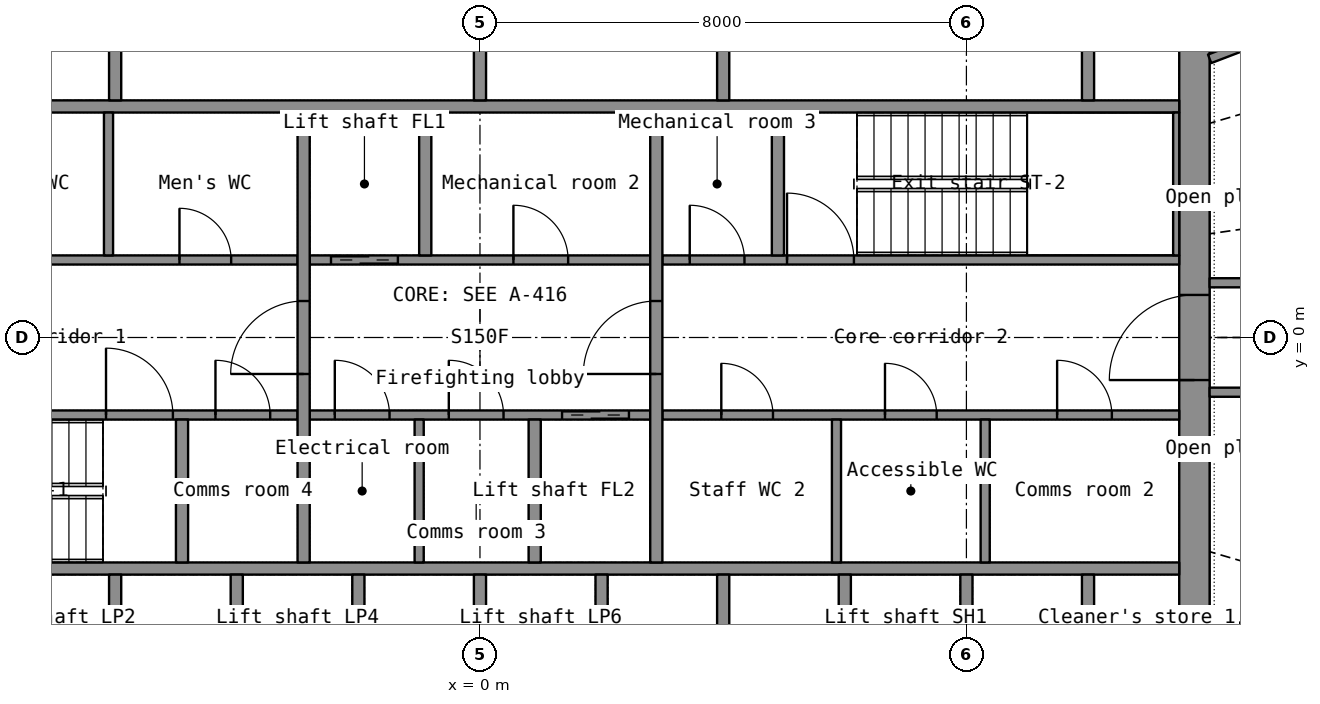
"""IFC4 building model, lengths in metres.
Left out: names, types, materials, properties, quantities, classifications, styles, units other than length and angle.
Written with IfcOpenShell. Run it as: python <this file> out.ifc"""

import sys

from ifc_helpers import new_model, si_unit, direction, frame, frame_2d, origin, place, context, subcontext, project, spatial, rectangle, extrude, element, fill, save


model = new_model("IFC4")
c1 = context("Model", 3, precision=1e-05, world=origin(), true_north=direction((0.0, 1.0)))
c2 = subcontext(c1, "Body", "Model", "MODEL_VIEW")
j1 = project(units=[si_unit("LENGTHUNIT", "METRE"), si_unit("PLANEANGLEUNIT", "RADIAN")], contexts=[c1])
p1 = place(None, origin())
s1 = spatial("IfcSite", under=j1, at=p1, CompositionType="ELEMENT")
p2 = place(p1, origin())
s2 = spatial("IfcBuilding", under=s1, at=p2, CompositionType="ELEMENT")
p3 = place(p2, frame((0.0, 0.0, 115.6)))
s3 = spatial("IfcBuildingStorey", under=s2, at=p3, CompositionType="ELEMENT", Elevation=115.6)
p4 = place(p3, frame((11.75, -7.2, 0.0), z_axis=(0.0, 0.0, 1.0), x_axis=(0.0, 1.0, 0.0)))
e1 = element("IfcWall", 1, at=p4, inside=s3, PredefinedType="SHEAR", context=c2, shape_type="SweptSolid", body=[
    extrude(rectangle(XDim=14.4, YDim=0.5, at=frame_2d((7.2, 0.0))), origin(), (0.0, 0.0, 1.0), 3.3),
])
p5 = place(p4, frame((6.5, 0.0, 0.0)))
e2 = element("IfcOpeningElement", 2, at=p5, cuts=e1, PredefinedType="OPENING", context=c2, shape_type="SweptSolid", body=[
    extrude(rectangle(XDim=1.4, YDim=2.2, at=frame_2d((0.7, 1.1))), frame((0.0, 0.26, 0.0), z_axis=(0.0, -1.0, 0.0), x_axis=(1.0, 0.0, 0.0)), (0.0, 0.0, 1.0), 0.52),
])
for number, where, z_axis, x_axis in (
    (3, (-11.5, -3.8, 0.0), (0.0, 0.0, 1.0), (1.0, 0.0, 0.0)),
    (4, (-11.5, 3.8, 0.0), (0.0, 0.0, 1.0), (1.0, 0.0, 0.0)),
):
    element("IfcWall", number, at=place(p3, frame(where, z_axis=z_axis, x_axis=x_axis)), inside=s3, PredefinedType="SHEAR", context=c2, shape_type="SweptSolid", body=[
        extrude(rectangle(XDim=23.0, YDim=0.2, at=frame_2d((11.5, 0.0))), origin(), (0.0, 0.0, 1.0), 3.3),
    ])
for number, where, z_axis, x_axis in (
    (5, (-6.0, -6.7, 0.0), (0.0, 0.0, 1.0), (0.0, 1.0, 0.0)),
    (6, (-4.0, -6.7, 0.0), (0.0, 0.0, 1.0), (0.0, 1.0, 0.0)),
    (7, (-2.0, -6.7, 0.0), (0.0, 0.0, 1.0), (0.0, 1.0, 0.0)),
    (8, (0.0, -6.7, 0.0), (0.0, 0.0, 1.0), (0.0, 1.0, 0.0)),
    (9, (2.0, -6.7, 0.0), (0.0, 0.0, 1.0), (0.0, 1.0, 0.0)),
    (10, (4.0, -6.7, 0.0), (0.0, 0.0, 1.0), (0.0, 1.0, 0.0)),
    (11, (6.0, -6.7, 0.0), (0.0, 0.0, 1.0), (0.0, 1.0, 0.0)),
    (12, (8.0, -6.7, 0.0), (0.0, 0.0, 1.0), (0.0, 1.0, 0.0)),
    (13, (10.0, -6.7, 0.0), (0.0, 0.0, 1.0), (0.0, 1.0, 0.0)),
    (14, (-6.0, 3.9, 0.0), (0.0, 0.0, 1.0), (0.0, 1.0, 0.0)),
    (15, (10.0, 3.9, 0.0), (0.0, 0.0, 1.0), (0.0, 1.0, 0.0)),
):
    element("IfcWall", number, at=place(p3, frame(where, z_axis=z_axis, x_axis=x_axis)), inside=s3, PredefinedType="SHEAR", context=c2, shape_type="SweptSolid", body=[
        extrude(rectangle(XDim=2.8, YDim=0.2, at=frame_2d((1.4, 0.0))), origin(), (0.0, 0.0, 1.0), 3.3),
    ])
for number, where, z_axis, x_axis in (
    (16, (0.0, 3.9, 0.0), (0.0, 0.0, 1.0), (0.0, 1.0, 0.0)),
    (17, (4.0, 3.9, 0.0), (0.0, 0.0, 1.0), (0.0, 1.0, 0.0)),
):
    element("IfcWall", number, at=place(p3, frame(where, z_axis=z_axis, x_axis=x_axis)), inside=s3, PredefinedType="PARTITIONING", context=c2, shape_type="SweptSolid", body=[
        extrude(rectangle(XDim=2.8, YDim=0.2, at=frame_2d((1.4, 0.0))), origin(), (0.0, 0.0, 1.0), 3.3),
    ])
p6 = place(p3, frame((-11.5, -1.275, 0.0), z_axis=(0.0, 0.0, 1.0), x_axis=(1.0, 0.0, 0.0)))
e18 = element("IfcWall", 18, at=p6, inside=s3, PredefinedType="SHEAR", context=c2, shape_type="SweptSolid", body=[
    extrude(rectangle(XDim=8.5, YDim=0.15, at=frame_2d((4.25, 0.0))), origin(), (0.0, 0.0, 1.0), 3.3),
])
p7 = place(p6, frame((5.35, 0.0, 0.0)))
e19 = element("IfcOpeningElement", 19, at=p7, cuts=e18, PredefinedType="OPENING", context=c2, shape_type="SweptSolid", body=[
    extrude(rectangle(XDim=1.1, YDim=2.15, at=frame_2d((0.55, 1.075))), frame((0.0, 0.085, 0.0), z_axis=(0.0, -1.0, 0.0), x_axis=(1.0, 0.0, 0.0)), (0.0, 0.0, 1.0), 0.17),
])
p8 = place(p6, frame((7.15, 0.0, 0.0)))
e20 = element("IfcOpeningElement", 20, at=p8, cuts=e18, PredefinedType="OPENING", context=c2, shape_type="SweptSolid", body=[
    extrude(rectangle(XDim=0.9, YDim=2.1, at=frame_2d((0.45, 1.05))), frame((0.0, 0.085, 0.0), z_axis=(0.0, -1.0, 0.0), x_axis=(1.0, 0.0, 0.0)), (0.0, 0.0, 1.0), 0.17),
])
p9 = place(p3, frame((-2.8, -1.275, 0.0), z_axis=(0.0, 0.0, 1.0), x_axis=(1.0, 0.0, 0.0)))
e21 = element("IfcWall", 21, at=p9, inside=s3, PredefinedType="SHEAR", context=c2, shape_type="SweptSolid", body=[
    extrude(rectangle(XDim=5.6, YDim=0.15, at=frame_2d((2.8, 0.0))), origin(), (0.0, 0.0, 1.0), 3.3),
])
p10 = place(p9, frame((4.15, 0.0, 0.0)))
e22 = element("IfcOpeningElement", 22, at=p10, cuts=e21, PredefinedType="OPENING", context=c2, shape_type="SweptSolid", body=[
    extrude(rectangle(XDim=1.1, YDim=2.2, at=frame_2d((0.55, 1.1))), frame((0.0, 0.085, 0.0), z_axis=(0.0, -1.0, 0.0), x_axis=(1.0, 0.0, 0.0)), (0.0, 0.0, 1.0), 0.17),
])
p11 = place(p9, frame((0.413, 0.0, 0.0)))
e23 = element("IfcOpeningElement", 23, at=p11, cuts=e21, PredefinedType="OPENING", context=c2, shape_type="SweptSolid", body=[
    extrude(rectangle(XDim=0.9, YDim=2.1, at=frame_2d((0.45, 1.05))), frame((0.0, 0.085, 0.0), z_axis=(0.0, -1.0, 0.0), x_axis=(1.0, 0.0, 0.0)), (0.0, 0.0, 1.0), 0.17),
])
p12 = place(p9, frame((2.288, 0.0, 0.0)))
e24 = element("IfcOpeningElement", 24, at=p12, cuts=e21, PredefinedType="OPENING", context=c2, shape_type="SweptSolid", body=[
    extrude(rectangle(XDim=0.9, YDim=2.1, at=frame_2d((0.45, 1.05))), frame((0.0, 0.085, 0.0), z_axis=(0.0, -1.0, 0.0), x_axis=(1.0, 0.0, 0.0)), (0.0, 0.0, 1.0), 0.17),
])
p13 = place(p3, frame((3.0, -1.275, 0.0), z_axis=(0.0, 0.0, 1.0), x_axis=(1.0, 0.0, 0.0)))
e25 = element("IfcWall", 25, at=p13, inside=s3, PredefinedType="PARTITIONING", context=c2, shape_type="SweptSolid", body=[
    extrude(rectangle(XDim=8.5, YDim=0.15, at=frame_2d((4.25, 0.0))), origin(), (0.0, 0.0, 1.0), 3.3),
])
p14 = place(p13, frame((0.969, 0.0, 0.0)))
e26 = element("IfcOpeningElement", 26, at=p14, cuts=e25, PredefinedType="OPENING", context=c2, shape_type="SweptSolid", body=[
    extrude(rectangle(XDim=0.85, YDim=2.1, at=frame_2d((0.425, 1.05))), frame((0.0, 0.085, 0.0), z_axis=(0.0, -1.0, 0.0), x_axis=(1.0, 0.0, 0.0)), (0.0, 0.0, 1.0), 0.17),
])
p15 = place(p13, frame((3.661, 0.0, 0.0)))
e27 = element("IfcOpeningElement", 27, at=p15, cuts=e25, PredefinedType="OPENING", context=c2, shape_type="SweptSolid", body=[
    extrude(rectangle(XDim=0.85, YDim=2.1, at=frame_2d((0.425, 1.05))), frame((0.0, 0.085, 0.0), z_axis=(0.0, -1.0, 0.0), x_axis=(1.0, 0.0, 0.0)), (0.0, 0.0, 1.0), 0.17),
])
p16 = place(p13, frame((6.492, 0.0, 0.0)))
e28 = element("IfcOpeningElement", 28, at=p16, cuts=e25, PredefinedType="OPENING", context=c2, shape_type="SweptSolid", body=[
    extrude(rectangle(XDim=0.9, YDim=2.1, at=frame_2d((0.45, 1.05))), frame((0.0, 0.085, 0.0), z_axis=(0.0, -1.0, 0.0), x_axis=(1.0, 0.0, 0.0)), (0.0, 0.0, 1.0), 0.17),
])
p17 = place(p3, frame((-11.5, 1.275, 0.0), z_axis=(0.0, 0.0, 1.0), x_axis=(1.0, 0.0, 0.0)))
e29 = element("IfcWall", 29, at=p17, inside=s3, PredefinedType="PARTITIONING", context=c2, shape_type="SweptSolid", body=[
    extrude(rectangle(XDim=8.5, YDim=0.15, at=frame_2d((4.25, 0.0))), origin(), (0.0, 0.0, 1.0), 3.3),
])
p18 = place(p17, frame((0.616, 0.0, 0.0)))
e30 = element("IfcOpeningElement", 30, at=p18, cuts=e29, PredefinedType="OPENING", context=c2, shape_type="SweptSolid", body=[
    extrude(rectangle(XDim=0.9, YDim=2.1, at=frame_2d((0.45, 1.05))), frame((0.0, 0.085, 0.0), z_axis=(0.0, -1.0, 0.0), x_axis=(1.0, 0.0, 0.0)), (0.0, 0.0, 1.0), 0.17),
])
p19 = place(p17, frame((3.374, 0.0, 0.0)))
e31 = element("IfcOpeningElement", 31, at=p19, cuts=e29, PredefinedType="OPENING", context=c2, shape_type="SweptSolid", body=[
    extrude(rectangle(XDim=0.85, YDim=2.1, at=frame_2d((0.425, 1.05))), frame((0.0, 0.085, 0.0), z_axis=(0.0, -1.0, 0.0), x_axis=(1.0, 0.0, 0.0)), (0.0, 0.0, 1.0), 0.17),
])
p20 = place(p17, frame((6.558, 0.0, 0.0)))
e32 = element("IfcOpeningElement", 32, at=p20, cuts=e29, PredefinedType="OPENING", context=c2, shape_type="SweptSolid", body=[
    extrude(rectangle(XDim=0.85, YDim=2.1, at=frame_2d((0.425, 1.05))), frame((0.0, 0.085, 0.0), z_axis=(0.0, -1.0, 0.0), x_axis=(1.0, 0.0, 0.0)), (0.0, 0.0, 1.0), 0.17),
])
p21 = place(p3, frame((-2.8, 1.275, 0.0), z_axis=(0.0, 0.0, 1.0), x_axis=(1.0, 0.0, 0.0)))
e33 = element("IfcWall", 33, at=p21, inside=s3, PredefinedType="SHEAR", context=c2, shape_type="SweptSolid", body=[
    extrude(rectangle(XDim=5.6, YDim=0.15, at=frame_2d((2.8, 0.0))), origin(), (0.0, 0.0, 1.0), 3.3),
])
p22 = place(p21, frame((0.35, 0.0, 0.0)))
e34 = element("IfcOpeningElement", 34, at=p22, cuts=e33, PredefinedType="OPENING", context=c2, shape_type="SweptSolid", body=[
    extrude(rectangle(XDim=1.1, YDim=2.2, at=frame_2d((0.55, 1.1))), frame((0.0, 0.085, 0.0), z_axis=(0.0, -1.0, 0.0), x_axis=(1.0, 0.0, 0.0)), (0.0, 0.0, 1.0), 0.17),
])
p23 = place(p21, frame((3.35, 0.0, 0.0)))
e35 = element("IfcOpeningElement", 35, at=p23, cuts=e33, PredefinedType="OPENING", context=c2, shape_type="SweptSolid", body=[
    extrude(rectangle(XDim=0.9, YDim=2.1, at=frame_2d((0.45, 1.05))), frame((0.0, 0.085, 0.0), z_axis=(0.0, -1.0, 0.0), x_axis=(1.0, 0.0, 0.0)), (0.0, 0.0, 1.0), 0.17),
])
p24 = place(p3, frame((3.0, 1.275, 0.0), z_axis=(0.0, 0.0, 1.0), x_axis=(1.0, 0.0, 0.0)))
e36 = element("IfcWall", 36, at=p24, inside=s3, PredefinedType="SHEAR", context=c2, shape_type="SweptSolid", body=[
    extrude(rectangle(XDim=8.5, YDim=0.15, at=frame_2d((4.25, 0.0))), origin(), (0.0, 0.0, 1.0), 3.3),
])
p25 = place(p24, frame((2.05, 0.0, 0.0)))
e37 = element("IfcOpeningElement", 37, at=p25, cuts=e36, PredefinedType="OPENING", context=c2, shape_type="SweptSolid", body=[
    extrude(rectangle(XDim=1.1, YDim=2.15, at=frame_2d((0.55, 1.075))), frame((0.0, 0.085, 0.0), z_axis=(0.0, -1.0, 0.0), x_axis=(1.0, 0.0, 0.0)), (0.0, 0.0, 1.0), 0.17),
])
p26 = place(p24, frame((0.45, 0.0, 0.0)))
e38 = element("IfcOpeningElement", 38, at=p26, cuts=e36, PredefinedType="OPENING", context=c2, shape_type="SweptSolid", body=[
    extrude(rectangle(XDim=0.9, YDim=2.1, at=frame_2d((0.45, 1.05))), frame((0.0, 0.085, 0.0), z_axis=(0.0, -1.0, 0.0), x_axis=(1.0, 0.0, 0.0)), (0.0, 0.0, 1.0), 0.17),
])
p27 = place(p3, frame((-2.9, -3.7, 0.0), z_axis=(0.0, 0.0, 1.0), x_axis=(0.0, 1.0, 0.0)))
e39 = element("IfcWall", 39, at=p27, inside=s3, PredefinedType="SHEAR", context=c2, shape_type="SweptSolid", body=[
    extrude(rectangle(XDim=7.4, YDim=0.2, at=frame_2d((3.7, 0.0))), origin(), (0.0, 0.0, 1.0), 3.3),
])
p28 = place(p27, frame((3.1, 0.0, 0.0)))
e40 = element("IfcOpeningElement", 40, at=p28, cuts=e39, PredefinedType="OPENING", context=c2, shape_type="SweptSolid", body=[
    extrude(rectangle(XDim=1.2, YDim=2.2, at=frame_2d((0.6, 1.1))), frame((0.0, 0.11, 0.0), z_axis=(0.0, -1.0, 0.0), x_axis=(1.0, 0.0, 0.0)), (0.0, 0.0, 1.0), 0.22),
])
p29 = place(p3, frame((2.9, -3.7, 0.0), z_axis=(0.0, 0.0, 1.0), x_axis=(0.0, 1.0, 0.0)))
e41 = element("IfcWall", 41, at=p29, inside=s3, PredefinedType="SHEAR", context=c2, shape_type="SweptSolid", body=[
    extrude(rectangle(XDim=7.4, YDim=0.2, at=frame_2d((3.7, 0.0))), origin(), (0.0, 0.0, 1.0), 3.3),
])
p30 = place(p29, frame((3.1, 0.0, 0.0)))
e42 = element("IfcOpeningElement", 42, at=p30, cuts=e41, PredefinedType="OPENING", context=c2, shape_type="SweptSolid", body=[
    extrude(rectangle(XDim=1.2, YDim=2.2, at=frame_2d((0.6, 1.1))), frame((0.0, 0.11, 0.0), z_axis=(0.0, -1.0, 0.0), x_axis=(1.0, 0.0, 0.0)), (0.0, 0.0, 1.0), 0.22),
])
for number, where, z_axis, x_axis in (
    (43, (-0.9, 1.35, 0.0), (0.0, 0.0, 1.0), (0.0, 1.0, 0.0)),
    (44, (0.9, -3.7, 0.0), (0.0, 0.0, 1.0), (0.0, 1.0, 0.0)),
):
    element("IfcWall", number, at=place(p3, frame(where, z_axis=z_axis, x_axis=x_axis)), inside=s3, PredefinedType="SHEAR", context=c2, shape_type="SweptSolid", body=[
        extrude(rectangle(XDim=2.35, YDim=0.2, at=frame_2d((1.175, 0.0))), origin(), (0.0, 0.0, 1.0), 3.3),
    ])
p31 = place(p3, frame((11.45, 1.35, 0.0), z_axis=(0.0, 0.0, 1.0), x_axis=(0.0, 1.0, 0.0)))
e45 = element("IfcWall", 45, at=p31, inside=s3, PredefinedType="SHEAR", context=c2, shape_type="SweptSolid", body=[
    extrude(rectangle(XDim=2.35, YDim=0.1, at=frame_2d((1.175, 0.0))), origin(), (0.0, 0.0, 1.0), 3.3),
])
for number, where, z_axis, x_axis in (
    (46, (-4.9, -3.7, 0.0), (0.0, 0.0, 1.0), (0.0, 1.0, 0.0)),
    (47, (4.9, 1.35, 0.0), (0.0, 0.0, 1.0), (0.0, 1.0, 0.0)),
):
    element("IfcWall", number, at=place(p3, frame(where, z_axis=z_axis, x_axis=x_axis)), inside=s3, PredefinedType="SHEAR", context=c2, shape_type="SweptSolid", body=[
        extrude(rectangle(XDim=2.35, YDim=0.2, at=frame_2d((1.175, 0.0))), origin(), (0.0, 0.0, 1.0), 3.3),
    ])
for number, where, z_axis, x_axis in (
    (48, (-6.109, 1.35, 0.0), (0.0, 0.0, 1.0), (0.0, 1.0, 0.0)),
    (49, (5.863, -3.7, 0.0), (0.0, 0.0, 1.0), (0.0, 1.0, 0.0)),
    (50, (8.309, -3.7, 0.0), (0.0, 0.0, 1.0), (0.0, 1.0, 0.0)),
    (51, (-1.0, -3.7, 0.0), (0.0, 0.0, 1.0), (0.0, 1.0, 0.0)),
):
    element("IfcWall", number, at=place(p3, frame(where, z_axis=z_axis, x_axis=x_axis)), inside=s3, PredefinedType="PARTITIONING", context=c2, shape_type="SweptSolid", body=[
        extrude(rectangle(XDim=2.35, YDim=0.15, at=frame_2d((1.175, 0.0))), origin(), (0.0, 0.0, 1.0), 3.3),
    ])
for number, where, z_axis, x_axis in (
    (52, (15.896, -6.072, 0.0), (0.0, 0.0, 1.0), (-0.934, 0.357, 0.0)),
    (53, (15.896, 6.072, 0.0), (0.0, 0.0, 1.0), (-0.934, -0.357, 0.0)),
):
    element("IfcWall", number, at=place(p3, frame(where, z_axis=z_axis, x_axis=x_axis)), inside=s3, PredefinedType="PARTITIONING", context=c2, shape_type="SweptSolid", body=[
        extrude(rectangle(XDim=4.171, YDim=0.15, at=frame_2d((2.085, 0.0))), origin(), (0.0, 0.0, 1.0), 2.4),
    ])
for number, where, z_axis, x_axis in (
    (54, (12.0, -0.9, 0.0), (0.0, 0.0, 1.0), (1.0, 0.0, 0.0)),
    (55, (15.923, 0.9, 0.0), (0.0, 0.0, 1.0), (-1.0, 0.0, 0.0)),
):
    element("IfcWall", number, at=place(p3, frame(where, z_axis=z_axis, x_axis=x_axis)), inside=s3, PredefinedType="PARTITIONING", context=c2, shape_type="SweptSolid", body=[
        extrude(rectangle(XDim=3.923, YDim=0.15, at=frame_2d((1.961, 0.0))), origin(), (0.0, 0.0, 1.0), 2.4),
    ])
p32 = place(p5, origin())
e56 = element("IfcDoor", 56, at=p32, inside=s3, OperationType="DOUBLE_DOOR_SINGLE_SWING", PredefinedType="DOOR", context=c2, shape_type="SweptSolid", body=[
    extrude(rectangle(XDim=1.4, YDim=2.2, at=frame_2d((0.7, 1.1))), frame((0.0, 0.025, 0.0), z_axis=(0.0, -1.0, 0.0), x_axis=(1.0, 0.0, 0.0)), (0.0, 0.0, 1.0), 0.05),
])
fill(e2, e56)
p33 = place(p28, origin())
e57 = element("IfcDoor", 57, at=p33, inside=s3, OperationType="SINGLE_SWING_LEFT", PredefinedType="DOOR", context=c2, shape_type="SweptSolid", body=[
    extrude(rectangle(XDim=1.2, YDim=2.2, at=frame_2d((0.6, 1.1))), frame((0.0, 0.025, 0.0), z_axis=(0.0, -1.0, 0.0), x_axis=(1.0, 0.0, 0.0)), (0.0, 0.0, 1.0), 0.05),
])
fill(e40, e57)
p34 = place(p30, origin())
e58 = element("IfcDoor", 58, at=p34, inside=s3, OperationType="SINGLE_SWING_LEFT", PredefinedType="DOOR", context=c2, shape_type="SweptSolid", body=[
    extrude(rectangle(XDim=1.2, YDim=2.2, at=frame_2d((0.6, 1.1))), frame((0.0, 0.025, 0.0), z_axis=(0.0, -1.0, 0.0), x_axis=(1.0, 0.0, 0.0)), (0.0, 0.0, 1.0), 0.05),
])
fill(e42, e58)
p35 = place(p22, origin())
e59 = element("IfcDoor", 59, at=p35, inside=s3, OperationType="DOUBLE_DOOR_SLIDING", PredefinedType="DOOR", context=c2, shape_type="SweptSolid", body=[
    extrude(rectangle(XDim=1.1, YDim=2.2, at=frame_2d((0.55, 1.1))), frame((0.0, 0.025, 0.0), z_axis=(0.0, -1.0, 0.0), x_axis=(1.0, 0.0, 0.0)), (0.0, 0.0, 1.0), 0.05),
])
fill(e34, e59)
p36 = place(p10, origin())
e60 = element("IfcDoor", 60, at=p36, inside=s3, OperationType="DOUBLE_DOOR_SLIDING", PredefinedType="DOOR", context=c2, shape_type="SweptSolid", body=[
    extrude(rectangle(XDim=1.1, YDim=2.2, at=frame_2d((0.55, 1.1))), frame((0.0, 0.025, 0.0), z_axis=(0.0, -1.0, 0.0), x_axis=(1.0, 0.0, 0.0)), (0.0, 0.0, 1.0), 0.05),
])
fill(e22, e60)
p37 = place(p7, origin())
e61 = element("IfcDoor", 61, at=p37, inside=s3, OperationType="SINGLE_SWING_LEFT", PredefinedType="DOOR", context=c2, shape_type="SweptSolid", body=[
    extrude(rectangle(XDim=1.1, YDim=2.15, at=frame_2d((0.55, 1.075))), frame((0.0, 0.025, 0.0), z_axis=(0.0, -1.0, 0.0), x_axis=(1.0, 0.0, 0.0)), (0.0, 0.0, 1.0), 0.05),
])
fill(e19, e61)
p38 = place(p25, origin())
e62 = element("IfcDoor", 62, at=p38, inside=s3, OperationType="SINGLE_SWING_LEFT", PredefinedType="DOOR", context=c2, shape_type="SweptSolid", body=[
    extrude(rectangle(XDim=1.1, YDim=2.15, at=frame_2d((0.55, 1.075))), frame((0.0, 0.025, 0.0), z_axis=(0.0, -1.0, 0.0), x_axis=(1.0, 0.0, 0.0)), (0.0, 0.0, 1.0), 0.05),
])
fill(e37, e62)
p39 = place(p20, origin())
e63 = element("IfcDoor", 63, at=p39, inside=s3, OperationType="SINGLE_SWING_LEFT", PredefinedType="DOOR", context=c2, shape_type="SweptSolid", body=[
    extrude(rectangle(XDim=0.85, YDim=2.1, at=frame_2d((0.425, 1.05))), frame((0.0, 0.025, 0.0), z_axis=(0.0, -1.0, 0.0), x_axis=(1.0, 0.0, 0.0)), (0.0, 0.0, 1.0), 0.05),
])
fill(e32, e63)
p40 = place(p14, origin())
e64 = element("IfcDoor", 64, at=p40, inside=s3, OperationType="SINGLE_SWING_LEFT", PredefinedType="DOOR", context=c2, shape_type="SweptSolid", body=[
    extrude(rectangle(XDim=0.85, YDim=2.1, at=frame_2d((0.425, 1.05))), frame((0.0, 0.025, 0.0), z_axis=(0.0, -1.0, 0.0), x_axis=(1.0, 0.0, 0.0)), (0.0, 0.0, 1.0), 0.05),
])
fill(e26, e64)
p41 = place(p15, origin())
e65 = element("IfcDoor", 65, at=p41, inside=s3, OperationType="SINGLE_SWING_LEFT", PredefinedType="DOOR", context=c2, shape_type="SweptSolid", body=[
    extrude(rectangle(XDim=0.85, YDim=2.1, at=frame_2d((0.425, 1.05))), frame((0.0, 0.025, 0.0), z_axis=(0.0, -1.0, 0.0), x_axis=(1.0, 0.0, 0.0)), (0.0, 0.0, 1.0), 0.05),
])
fill(e27, e65)
p42 = place(p16, origin())
e66 = element("IfcDoor", 66, at=p42, inside=s3, OperationType="SINGLE_SWING_LEFT", PredefinedType="DOOR", context=c2, shape_type="SweptSolid", body=[
    extrude(rectangle(XDim=0.9, YDim=2.1, at=frame_2d((0.45, 1.05))), frame((0.0, 0.025, 0.0), z_axis=(0.0, -1.0, 0.0), x_axis=(1.0, 0.0, 0.0)), (0.0, 0.0, 1.0), 0.05),
])
fill(e28, e66)
p43 = place(p23, origin())
e67 = element("IfcDoor", 67, at=p43, inside=s3, OperationType="SINGLE_SWING_LEFT", PredefinedType="DOOR", context=c2, shape_type="SweptSolid", body=[
    extrude(rectangle(XDim=0.9, YDim=2.1, at=frame_2d((0.45, 1.05))), frame((0.0, 0.025, 0.0), z_axis=(0.0, -1.0, 0.0), x_axis=(1.0, 0.0, 0.0)), (0.0, 0.0, 1.0), 0.05),
])
fill(e35, e67)
p44 = place(p11, origin())
e68 = element("IfcDoor", 68, at=p44, inside=s3, OperationType="SINGLE_SWING_LEFT", PredefinedType="DOOR", context=c2, shape_type="SweptSolid", body=[
    extrude(rectangle(XDim=0.9, YDim=2.1, at=frame_2d((0.45, 1.05))), frame((0.0, 0.025, 0.0), z_axis=(0.0, -1.0, 0.0), x_axis=(1.0, 0.0, 0.0)), (0.0, 0.0, 1.0), 0.05),
])
fill(e23, e68)
p45 = place(p12, origin())
e69 = element("IfcDoor", 69, at=p45, inside=s3, OperationType="SINGLE_SWING_LEFT", PredefinedType="DOOR", context=c2, shape_type="SweptSolid", body=[
    extrude(rectangle(XDim=0.9, YDim=2.1, at=frame_2d((0.45, 1.05))), frame((0.0, 0.025, 0.0), z_axis=(0.0, -1.0, 0.0), x_axis=(1.0, 0.0, 0.0)), (0.0, 0.0, 1.0), 0.05),
])
fill(e24, e69)
p46 = place(p26, origin())
e70 = element("IfcDoor", 70, at=p46, inside=s3, OperationType="SINGLE_SWING_LEFT", PredefinedType="DOOR", context=c2, shape_type="SweptSolid", body=[
    extrude(rectangle(XDim=0.9, YDim=2.1, at=frame_2d((0.45, 1.05))), frame((0.0, 0.025, 0.0), z_axis=(0.0, -1.0, 0.0), x_axis=(1.0, 0.0, 0.0)), (0.0, 0.0, 1.0), 0.05),
])
fill(e38, e70)
p47 = place(p8, origin())
e71 = element("IfcDoor", 71, at=p47, inside=s3, OperationType="SINGLE_SWING_LEFT", PredefinedType="DOOR", context=c2, shape_type="SweptSolid", body=[
    extrude(rectangle(XDim=0.9, YDim=2.1, at=frame_2d((0.45, 1.05))), frame((0.0, 0.025, 0.0), z_axis=(0.0, -1.0, 0.0), x_axis=(1.0, 0.0, 0.0)), (0.0, 0.0, 1.0), 0.05),
])
fill(e20, e71)
save(model, sys.argv[1])
